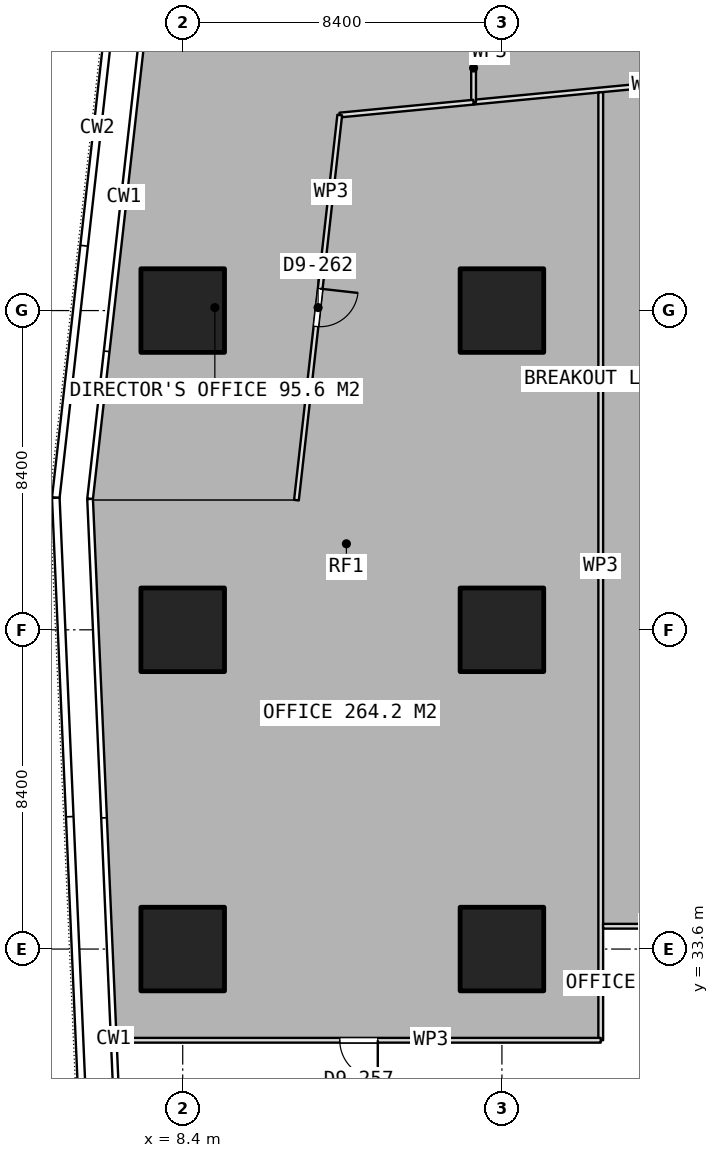
"""IFC4 building model, lengths in metres.
Left out: names, types, materials, properties, quantities, classifications, styles, units other than length and angle.
Written with IfcOpenShell. Run it as: python <this file> out.ifc"""

import sys

from ifc_helpers import new_model, si_unit, direction, frame, frame_2d, origin, origin_2d, place, context, subcontext, project, spatial, rectangle, extrude, element, fill, save


model = new_model("IFC4")
c1 = context("Model", 3, precision=1e-05, world=origin(), true_north=direction((0.0, 1.0)))
c2 = subcontext(c1, "Body", "Model", "MODEL_VIEW")
j1 = project(units=[si_unit("LENGTHUNIT", "METRE"), si_unit("PLANEANGLEUNIT", "RADIAN")], contexts=[c1])
p1 = place(None, origin())
s1 = spatial("IfcSite", under=j1, at=p1, CompositionType="ELEMENT")
p2 = place(p1, origin())
s2 = spatial("IfcBuilding", under=s1, at=p2, CompositionType="ELEMENT")
p3 = place(p2, frame((0.0, 0.0, 74.15)))
s3 = spatial("IfcBuildingStorey", under=s2, at=p3, CompositionType="ELEMENT", Elevation=74.15)
for number, where, z_axis, x_axis in (
    (1, (8.4, 33.6, 0.0), (0.0, 0.0, 1.0), (1.0, 0.0, 0.0)),
    (2, (8.4, 42.0, 0.0), (0.0, 0.0, 1.0), (1.0, 0.0, 0.0)),
    (3, (8.4, 50.4, 0.0), (0.0, 0.0, 1.0), (1.0, 0.0, 0.0)),
    (4, (16.8, 33.6, 0.0), (0.0, 0.0, 1.0), (1.0, 0.0, 0.0)),
    (5, (16.8, 42.0, 0.0), (0.0, 0.0, 1.0), (1.0, 0.0, 0.0)),
    (6, (16.8, 50.4, 0.0), (0.0, 0.0, 1.0), (1.0, 0.0, 0.0)),
):
    element("IfcColumn", number, at=place(p3, frame(where, z_axis=z_axis, x_axis=x_axis)), inside=s3, PredefinedType="COLUMN", context=c2, shape_type="SweptSolid", body=[
        extrude(rectangle(XDim=2.2, YDim=2.2, at=origin_2d()), origin(), (0.0, 0.0, 1.0), 3.75),
    ])
p4 = place(p3, frame((25.287, 56.772, 0.0), z_axis=(0.0, 0.0, 1.0), x_axis=(-0.995407630517, -0.095726950797, 0.0)))
e7 = element("IfcWall", 7, at=p4, inside=s3, PredefinedType="PARTITIONING", context=c2, shape_type="SweptSolid", body=[
    extrude(rectangle(XDim=9.276, YDim=0.125, at=frame_2d((4.638, 0.0))), origin(), (0.0, 0.0, 1.0), 3.5),
])
p5 = place(p3, frame((16.054, 55.884, 0.0), z_axis=(0.0, 0.0, 1.0), x_axis=(0.0, 1.0, 0.0)))
e8 = element("IfcWall", 8, at=p5, inside=s3, PredefinedType="PARTITIONING", context=c2, shape_type="SweptSolid", body=[
    extrude(rectangle(XDim=1.796, YDim=0.125, at=frame_2d((0.898, 0.0))), origin(), (0.0, 0.0, 1.0), 3.5),
])
p6 = place(p3, frame((16.053, 55.883, 0.0), z_axis=(0.0, 0.0, 1.0), x_axis=(-0.995420403314, -0.095594040951, 0.0)))
e9 = element("IfcWall", 9, at=p6, inside=s3, PredefinedType="PARTITIONING", context=c2, shape_type="SweptSolid", body=[
    extrude(rectangle(XDim=3.537, YDim=0.125, at=frame_2d((1.769, 0.0))), origin(), (0.0, 0.0, 1.0), 3.5),
])
p7 = place(p3, frame((12.532, 55.545, 0.0), z_axis=(0.0, 0.0, 1.0), x_axis=(-0.111695467503, -0.99374248301, 0.0)))
e10 = element("IfcWall", 10, at=p7, inside=s3, PredefinedType="PARTITIONING", context=c2, shape_type="SweptSolid", body=[
    extrude(rectangle(XDim=10.197, YDim=0.125, at=frame_2d((5.098, 0.0))), origin(), (0.0, 0.0, 1.0), 3.5),
])
p8 = place(p7, frame((4.598, 0.0, 0.0)))
e11 = element("IfcOpeningElement", 11, at=p8, cuts=e10, PredefinedType="OPENING", context=c2, shape_type="SweptSolid", body=[
    extrude(rectangle(XDim=1.0, YDim=2.1, at=frame_2d((0.5, 1.05))), frame((0.0, 0.073, 0.0), z_axis=(0.0, -1.0, 0.0), x_axis=(1.0, 0.0, 0.0)), (0.0, 0.0, 1.0), 0.145),
])
p9 = place(p3, frame((19.4, 56.143, 0.0), z_axis=(0.0, 0.0, 1.0), x_axis=(0.0, -1.0, 0.0)))
e12 = element("IfcWall", 12, at=p9, inside=s3, PredefinedType="PARTITIONING", context=c2, shape_type="SweptSolid", body=[
    extrude(rectangle(XDim=24.943, YDim=0.125, at=frame_2d((12.472, 0.0))), origin(), (0.0, 0.0, 1.0), 3.5),
])
p10 = place(p3, frame((19.4, 31.2, 0.0), z_axis=(0.0, 0.0, 1.0), x_axis=(-1.0, 0.0, 0.0)))
e13 = element("IfcWall", 13, at=p10, inside=s3, PredefinedType="PARTITIONING", context=c2, shape_type="SweptSolid", body=[
    extrude(rectangle(XDim=12.765, YDim=0.125, at=frame_2d((6.382, 0.0))), origin(), (0.0, 0.0, 1.0), 3.5),
])
p11 = place(p10, frame((5.867, 0.0, 0.0)))
e14 = element("IfcOpeningElement", 14, at=p11, cuts=e13, PredefinedType="OPENING", context=c2, shape_type="SweptSolid", body=[
    extrude(rectangle(XDim=1.0, YDim=2.1, at=frame_2d((0.5, 1.05))), frame((0.0, 0.073, 0.0), z_axis=(0.0, -1.0, 0.0), x_axis=(1.0, 0.0, 0.0)), (0.0, 0.0, 1.0), 0.145),
])
p12 = place(p3, frame((22.4, 34.2, 0.0), z_axis=(0.0, 0.0, 1.0), x_axis=(-1.0, 0.0, 0.0)))
e15 = element("IfcWall", 15, at=p12, inside=s3, PredefinedType="PARTITIONING", context=c2, shape_type="SweptSolid", body=[
    extrude(rectangle(XDim=2.938, YDim=0.125, at=frame_2d((1.469, 0.0))), origin(), (0.0, 0.0, 1.0), 3.5),
])
p13 = place(p11, origin())
e16 = element("IfcDoor", 16, at=p13, inside=s3, OperationType="SINGLE_SWING_LEFT", PredefinedType="DOOR", context=c2, shape_type="SweptSolid", body=[
    extrude(rectangle(XDim=1.0, YDim=2.1, at=frame_2d((0.5, 1.05))), frame((0.0, 0.025, 0.0), z_axis=(0.0, -1.0, 0.0), x_axis=(1.0, 0.0, 0.0)), (0.0, 0.0, 1.0), 0.05),
])
fill(e14, e16)
p14 = place(p8, origin())
e17 = element("IfcDoor", 17, at=p14, inside=s3, OperationType="SINGLE_SWING_LEFT", PredefinedType="DOOR", context=c2, shape_type="SweptSolid", body=[
    extrude(rectangle(XDim=1.0, YDim=2.1, at=frame_2d((0.5, 1.05))), frame((0.0, 0.025, 0.0), z_axis=(0.0, -1.0, 0.0), x_axis=(1.0, 0.0, 0.0)), (0.0, 0.0, 1.0), 0.05),
])
fill(e11, e17)
save(model, sys.argv[1])
